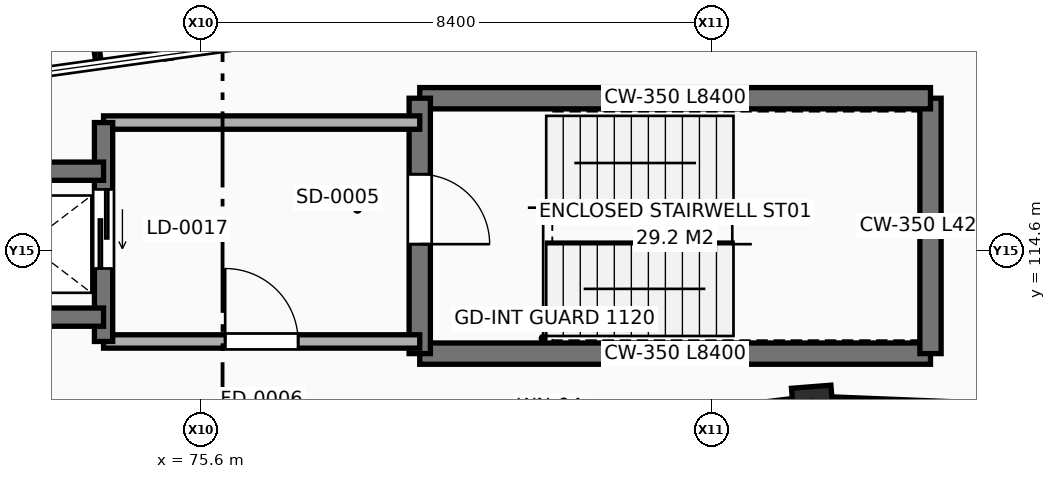
"""IFC4 building model, lengths in metres.
Left out: names, types, materials, properties, quantities, classifications, styles, units other than length and angle.
Written with IfcOpenShell. Run it as: python <this file> out.ifc"""

import sys

from ifc_helpers import new_model, si_unit, direction, frame, frame_2d, origin, origin_2d, place, context, subcontext, project, spatial, rectangle, extrude, element, fill, save


model = new_model("IFC4")
c1 = context("Model", 3, precision=1e-05, world=origin(), true_north=direction((0.0, 1.0)))
c2 = subcontext(c1, "Body", "Model", "MODEL_VIEW")
j1 = project(units=[si_unit("LENGTHUNIT", "METRE"), si_unit("PLANEANGLEUNIT", "RADIAN")], contexts=[c1])
p1 = place(None, origin())
s1 = spatial("IfcSite", under=j1, at=p1, CompositionType="ELEMENT")
p2 = place(p1, origin())
s2 = spatial("IfcBuilding", under=s1, at=p2, CompositionType="ELEMENT")
p3 = place(p2, frame((0.0, 0.0, 9.6)))
s3 = spatial("IfcBuildingStorey", under=s2, at=p3, CompositionType="ELEMENT", Elevation=9.6)
p4 = place(p3, frame((85.664, 112.031, 0.0), z_axis=(0.0, 0.0, 1.0), x_axis=(-0.078459095728, 0.996917333733, 0.0)))
e1 = element("IfcColumn", 1, at=p4, inside=s3, PredefinedType="COLUMN", context=c2, shape_type="SweptSolid", body=[
    extrude(rectangle(XDim=0.65, YDim=0.65, at=origin_2d()), origin(), (0.0, 0.0, 1.0), 4.2),
])
p5 = place(p3, frame((98.941, 111.499, 0.0), z_axis=(0.0, 0.0, 1.0), x_axis=(-0.999197908265, 0.040044227027, 0.0)))
e2 = element("IfcWall", 2, at=p5, inside=s3, PredefinedType="SOLIDWALL", context=c2, shape_type="SweptSolid", body=[
    extrude(rectangle(XDim=12.925, YDim=0.34, at=frame_2d((6.462, 0.0))), origin(), (0.0, 0.0, 1.0), 3.387),
])
p6 = place(p5, frame((3.308, 0.0, 0.9)))
e3 = element("IfcOpeningElement", 3, at=p6, cuts=e2, PredefinedType="OPENING", context=c2, shape_type="SweptSolid", body=[
    extrude(rectangle(XDim=1.5, YDim=2.1, at=frame_2d((0.75, 1.05))), frame((0.0, 0.18, 0.0), z_axis=(0.0, -1.0, 0.0), x_axis=(1.0, 0.0, 0.0)), (0.0, 0.0, 1.0), 0.36),
])
p7 = place(p5, frame((8.117, 0.0, 0.9)))
e4 = element("IfcOpeningElement", 4, at=p7, cuts=e2, PredefinedType="OPENING", context=c2, shape_type="SweptSolid", body=[
    extrude(rectangle(XDim=1.5, YDim=2.1, at=frame_2d((0.75, 1.05))), frame((0.0, 0.18, 0.0), z_axis=(0.0, -1.0, 0.0), x_axis=(1.0, 0.0, 0.0)), (0.0, 0.0, 1.0), 0.36),
])
p8 = place(p3, frame((85.325, 111.99, 0.0), z_axis=(0.0, 0.0, 1.0), x_axis=(-0.992612435924, -0.121328282152, 0.0)))
e5 = element("IfcWall", 5, at=p8, inside=s3, PredefinedType="SOLIDWALL", context=c2, shape_type="SweptSolid", body=[
    extrude(rectangle(XDim=12.681, YDim=0.34, at=frame_2d((6.341, 0.0))), origin(), (0.0, 0.0, 1.0), 3.387),
])
p9 = place(p8, frame((3.127, 0.0, 0.9)))
e6 = element("IfcOpeningElement", 6, at=p9, cuts=e5, PredefinedType="OPENING", context=c2, shape_type="SweptSolid", body=[
    extrude(rectangle(XDim=1.65, YDim=2.1, at=frame_2d((0.825, 1.05))), frame((0.0, 0.18, 0.0), z_axis=(0.0, -1.0, 0.0), x_axis=(1.0, 0.0, 0.0)), (0.0, 0.0, 1.0), 0.36),
])
p10 = place(p8, frame((7.904, 0.0, 0.9)))
e7 = element("IfcOpeningElement", 7, at=p10, cuts=e5, PredefinedType="OPENING", context=c2, shape_type="SweptSolid", body=[
    extrude(rectangle(XDim=1.65, YDim=2.1, at=frame_2d((0.825, 1.05))), frame((0.0, 0.18, 0.0), z_axis=(0.0, -1.0, 0.0), x_axis=(1.0, 0.0, 0.0)), (0.0, 0.0, 1.0), 0.36),
])
p11 = place(p3, frame((79.2, 112.9, 0.0), z_axis=(0.0, 0.0, 1.0), x_axis=(1.0, 0.0, 0.0)))
e8 = element("IfcWall", 8, at=p11, inside=s3, PredefinedType="SHEAR", context=c2, shape_type="SweptSolid", body=[
    extrude(rectangle(XDim=8.4, YDim=0.35, at=frame_2d((4.2, 0.0))), origin(), (0.0, 0.0, 1.0), 3.92),
])
p12 = place(p3, frame((87.6, 112.9, 0.0), z_axis=(0.0, 0.0, 1.0), x_axis=(0.0, 1.0, 0.0)))
e9 = element("IfcWall", 9, at=p12, inside=s3, PredefinedType="SHEAR", context=c2, shape_type="SweptSolid", body=[
    extrude(rectangle(XDim=4.2, YDim=0.35, at=frame_2d((2.1, 0.0))), origin(), (0.0, 0.0, 1.0), 3.92),
])
p13 = place(p3, frame((87.6, 117.1, 0.0), z_axis=(0.0, 0.0, 1.0), x_axis=(-1.0, 0.0, 0.0)))
e10 = element("IfcWall", 10, at=p13, inside=s3, PredefinedType="SHEAR", context=c2, shape_type="SweptSolid", body=[
    extrude(rectangle(XDim=8.4, YDim=0.35, at=frame_2d((4.2, 0.0))), origin(), (0.0, 0.0, 1.0), 3.92),
])
p14 = place(p3, frame((79.2, 117.1, 0.0), z_axis=(0.0, 0.0, 1.0), x_axis=(0.0, -1.0, 0.0)))
e11 = element("IfcWall", 11, at=p14, inside=s3, PredefinedType="SHEAR", context=c2, shape_type="SweptSolid", body=[
    extrude(rectangle(XDim=4.2, YDim=0.35, at=frame_2d((2.1, 0.0))), origin(), (0.0, 0.0, 1.0), 3.92),
])
p15 = place(p14, frame((1.25, 0.0, 0.0)))
e12 = element("IfcOpeningElement", 12, at=p15, cuts=e11, PredefinedType="OPENING", context=c2, shape_type="SweptSolid", body=[
    extrude(rectangle(XDim=1.15, YDim=2.2, at=frame_2d((0.575, 1.1))), frame((0.0, 0.185, 0.0), z_axis=(0.0, -1.0, 0.0), x_axis=(1.0, 0.0, 0.0)), (0.0, 0.0, 1.0), 0.37),
])
p16 = place(p3, frame((74.0, 113.1, 0.0), z_axis=(0.0, 0.0, 1.0), x_axis=(1.0, 0.0, 0.0)))
e13 = element("IfcWall", 13, at=p16, inside=s3, PredefinedType="SOLIDWALL", context=c2, shape_type="SweptSolid", body=[
    extrude(rectangle(XDim=5.2, YDim=0.22, at=frame_2d((2.6, 0.0))), origin(), (0.0, 0.0, 1.0), 3.92),
])
p17 = place(p16, frame((2.0, 0.0, 0.0)))
e14 = element("IfcOpeningElement", 14, at=p17, cuts=e13, PredefinedType="OPENING", context=c2, shape_type="SweptSolid", body=[
    extrude(rectangle(XDim=1.2, YDim=2.2, at=frame_2d((0.6, 1.1))), frame((0.0, 0.12, 0.0), z_axis=(0.0, -1.0, 0.0), x_axis=(1.0, 0.0, 0.0)), (0.0, 0.0, 1.0), 0.24),
])
p18 = place(p3, frame((79.2, 116.7, 0.0), z_axis=(0.0, 0.0, 1.0), x_axis=(-1.0, 0.0, 0.0)))
e15 = element("IfcWall", 15, at=p18, inside=s3, PredefinedType="SOLIDWALL", context=c2, shape_type="SweptSolid", body=[
    extrude(rectangle(XDim=5.2, YDim=0.22, at=frame_2d((2.6, 0.0))), origin(), (0.0, 0.0, 1.0), 3.92),
])
p19 = place(p3, frame((74.0, 116.7, 0.0), z_axis=(0.0, 0.0, 1.0), x_axis=(0.0, -1.0, 0.0)))
e16 = element("IfcWall", 16, at=p19, inside=s3, PredefinedType="SHEAR", context=c2, shape_type="SweptSolid", body=[
    extrude(rectangle(XDim=3.6, YDim=0.3, at=frame_2d((1.8, 0.0))), origin(), (0.0, 0.0, 1.0), 3.92),
])
p20 = place(p19, frame((1.1, 0.0, 0.0)))
e17 = element("IfcOpeningElement", 17, at=p20, cuts=e16, PredefinedType="OPENING", context=c2, shape_type="SweptSolid", body=[
    extrude(rectangle(XDim=1.3, YDim=2.3, at=frame_2d((0.65, 1.15))), frame((0.0, 0.16, 0.0), z_axis=(0.0, -1.0, 0.0), x_axis=(1.0, 0.0, 0.0)), (0.0, 0.0, 1.0), 0.32),
])
for number, where, z_axis, x_axis in (
    (18, (74.0, 115.9, 0.0), (0.0, 0.0, 1.0), (-1.0, 0.0, 0.0)),
    (19, (71.5, 113.5, 0.0), (0.0, 0.0, 1.0), (1.0, 0.0, 0.0)),
):
    element("IfcWall", number, at=place(p3, frame(where, z_axis=z_axis, x_axis=x_axis)), inside=s3, PredefinedType="SHEAR", context=c2, shape_type="SweptSolid", body=[
        extrude(rectangle(XDim=2.5, YDim=0.3, at=frame_2d((1.25, 0.0))), origin(), (0.0, 0.0, 1.0), 3.92),
    ])
p21 = place(p15, origin())
e20 = element("IfcDoor", 20, at=p21, inside=s3, OperationType="SINGLE_SWING_RIGHT", PredefinedType="DOOR", context=c2, shape_type="SweptSolid", body=[
    extrude(rectangle(XDim=1.15, YDim=2.2, at=frame_2d((0.575, 1.1))), frame((0.0, 0.025, 0.0), z_axis=(0.0, -1.0, 0.0), x_axis=(1.0, 0.0, 0.0)), (0.0, 0.0, 1.0), 0.05),
])
fill(e12, e20)
p22 = place(p17, origin())
e21 = element("IfcDoor", 21, at=p22, inside=s3, OperationType="SINGLE_SWING_LEFT", PredefinedType="DOOR", context=c2, shape_type="SweptSolid", body=[
    extrude(rectangle(XDim=1.2, YDim=2.2, at=frame_2d((0.6, 1.1))), frame((0.0, 0.025, 0.0), z_axis=(0.0, -1.0, 0.0), x_axis=(1.0, 0.0, 0.0)), (0.0, 0.0, 1.0), 0.05),
])
fill(e14, e21)
p23 = place(p20, origin())
e22 = element("IfcDoor", 22, at=p23, inside=s3, OperationType="SLIDING_TO_LEFT", PredefinedType="DOOR", context=c2, shape_type="SweptSolid", body=[
    extrude(rectangle(XDim=1.3, YDim=2.3, at=frame_2d((0.65, 1.15))), frame((0.0, 0.025, 0.0), z_axis=(0.0, -1.0, 0.0), x_axis=(1.0, 0.0, 0.0)), (0.0, 0.0, 1.0), 0.05),
])
fill(e17, e22)
save(model, sys.argv[1])
